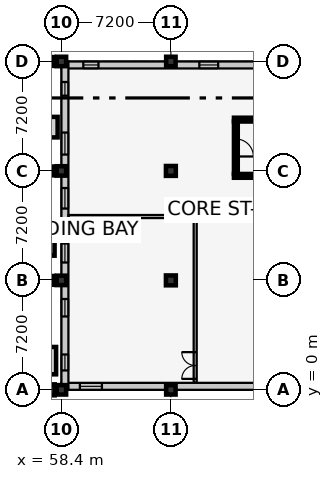
"""IFC4 building model, lengths in metres.
Left out: names, types, materials, properties, quantities, classifications, styles, units other than length and angle.
Written with IfcOpenShell. Run it as: python <this file> out.ifc"""

import sys

from ifc_helpers import new_model, si_unit, direction, frame, frame_2d, origin, origin_2d, place, context, subcontext, project, spatial, rectangle, extrude, element, fill, save


model = new_model("IFC4")
c1 = context("Model", 3, precision=1e-05, world=origin(), true_north=direction((0.0, 1.0)))
c2 = subcontext(c1, "Body", "Model", "MODEL_VIEW")
j1 = project(units=[si_unit("LENGTHUNIT", "METRE"), si_unit("PLANEANGLEUNIT", "RADIAN")], contexts=[c1])
p1 = place(None, origin())
s1 = spatial("IfcSite", under=j1, at=p1, CompositionType="ELEMENT")
p2 = place(p1, origin())
s2 = spatial("IfcBuilding", under=s1, at=p2, CompositionType="ELEMENT")
p3 = place(p2, origin())
s3 = spatial("IfcBuildingStorey", under=s2, at=p3, CompositionType="ELEMENT", Elevation=0.0)
p4 = place(p3, frame((57.6, 0.0, 0.0), z_axis=(0.0, 0.0, 1.0), x_axis=(1.0, 0.0, 0.0)))
e1 = element("IfcColumn", 1, at=p4, inside=s3, PredefinedType="COLUMN", context=c2, shape_type="SweptSolid", body=[
    extrude(rectangle(XDim=0.72, YDim=0.72, at=origin_2d()), origin(), (0.0, 0.0, 1.0), 5.4),
])
for number, where, z_axis, x_axis in (
    (2, (57.6, 7.2, 0.0), (0.0, 0.0, 1.0), (1.0, 0.0, 0.0)),
    (3, (57.6, 14.4, 0.0), (0.0, 0.0, 1.0), (1.0, 0.0, 0.0)),
    (4, (57.6, 21.6, 0.0), (0.0, 0.0, 1.0), (1.0, 0.0, 0.0)),
):
    element("IfcColumn", number, at=place(p3, frame(where, z_axis=z_axis, x_axis=x_axis)), inside=s3, PredefinedType="COLUMN", context=c2, shape_type="SweptSolid", body=[
        extrude(rectangle(XDim=0.58, YDim=0.58, at=origin_2d()), origin(), (0.0, 0.0, 1.0), 5.4),
    ])
for number, where, z_axis, x_axis in (
    (5, (58.4, 0.0, 0.0), (0.0, 0.0, 1.0), (1.0, 0.0, 0.0)),
    (6, (58.4, 7.2, 0.0), (0.0, 0.0, 1.0), (1.0, 0.0, 0.0)),
    (7, (58.4, 14.4, 0.0), (0.0, 0.0, 1.0), (1.0, 0.0, 0.0)),
    (8, (58.4, 21.6, 0.0), (0.0, 0.0, 1.0), (1.0, 0.0, 0.0)),
    (9, (65.6, 0.0, 0.0), (0.0, 0.0, 1.0), (1.0, 0.0, 0.0)),
):
    element("IfcColumn", number, at=place(p3, frame(where, z_axis=z_axis, x_axis=x_axis)), inside=s3, PredefinedType="COLUMN", context=c2, shape_type="SweptSolid", body=[
        extrude(rectangle(XDim=0.62, YDim=0.62, at=origin_2d()), origin(), (0.0, 0.0, 1.0), 5.4),
    ])
for number, where, z_axis, x_axis in (
    (10, (65.6, 7.2, 0.0), (0.0, 0.0, 1.0), (1.0, 0.0, 0.0)),
    (11, (65.6, 14.4, 0.0), (0.0, 0.0, 1.0), (1.0, 0.0, 0.0)),
):
    element("IfcColumn", number, at=place(p3, frame(where, z_axis=z_axis, x_axis=x_axis)), inside=s3, PredefinedType="COLUMN", context=c2, shape_type="SweptSolid", body=[
        extrude(rectangle(XDim=0.65, YDim=0.65, at=origin_2d()), origin(), (0.0, 0.0, 1.0), 5.4),
    ])
p5 = place(p3, frame((65.6, 21.6, 0.0), z_axis=(0.0, 0.0, 1.0), x_axis=(1.0, 0.0, 0.0)))
e12 = element("IfcColumn", 12, at=p5, inside=s3, PredefinedType="COLUMN", context=c2, shape_type="SweptSolid", body=[
    extrude(rectangle(XDim=0.62, YDim=0.62, at=origin_2d()), origin(), (0.0, 0.0, 1.0), 5.4),
])
p6 = place(p3, frame((108.8, 0.23, 0.0), z_axis=(0.0, 0.0, 1.0), x_axis=(-1.0, 0.0, 0.0)))
e13 = element("IfcWall", 13, at=p6, inside=s3, PredefinedType="SOLIDWALL", context=c2, shape_type="SweptSolid", body=[
    extrude(rectangle(XDim=50.4, YDim=0.46, at=frame_2d((25.2, 0.0))), origin(), (0.0, 0.0, 1.0), 4.445),
])
p7 = place(p6, frame((31.2, 0.0, 0.0)))
e14 = element("IfcOpeningElement", 14, at=p7, cuts=e13, PredefinedType="OPENING", context=c2, shape_type="SweptSolid", body=[
    extrude(rectangle(XDim=2.4, YDim=2.4, at=frame_2d((1.2, 1.2))), frame((0.0, 0.242, 0.0), z_axis=(0.0, -1.0, 0.0), x_axis=(1.0, 0.0, 0.0)), (0.0, 0.0, 1.0), 0.484),
])
p8 = place(p6, frame((24.4, 0.0, 0.0)))
e15 = element("IfcOpeningElement", 15, at=p8, cuts=e13, PredefinedType="OPENING", context=c2, shape_type="SweptSolid", body=[
    extrude(rectangle(XDim=2.4, YDim=2.4, at=frame_2d((1.2, 1.2))), frame((0.0, 0.242, 0.0), z_axis=(0.0, -1.0, 0.0), x_axis=(1.0, 0.0, 0.0)), (0.0, 0.0, 1.0), 0.484),
])
p9 = place(p6, frame((1.188, 0.0, 0.9)))
e16 = element("IfcOpeningElement", 16, at=p9, cuts=e13, PredefinedType="OPENING", context=c2, shape_type="SweptSolid", body=[
    extrude(rectangle(XDim=1.5, YDim=1.75, at=frame_2d((0.75, 0.875))), frame((0.0, 0.242, 0.0), z_axis=(0.0, -1.0, 0.0), x_axis=(1.0, 0.0, 0.0)), (0.0, 0.0, 1.0), 0.484),
])
p10 = place(p6, frame((5.365, 0.0, 0.9)))
e17 = element("IfcOpeningElement", 17, at=p10, cuts=e13, PredefinedType="OPENING", context=c2, shape_type="SweptSolid", body=[
    extrude(rectangle(XDim=0.9, YDim=1.35, at=frame_2d((0.45, 0.675))), frame((0.0, 0.242, 0.0), z_axis=(0.0, -1.0, 0.0), x_axis=(1.0, 0.0, 0.0)), (0.0, 0.0, 1.0), 0.484),
])
p11 = place(p6, frame((9.192, 0.0, 0.9)))
e18 = element("IfcOpeningElement", 18, at=p11, cuts=e13, PredefinedType="OPENING", context=c2, shape_type="SweptSolid", body=[
    extrude(rectangle(XDim=1.0, YDim=1.35, at=frame_2d((0.5, 0.675))), frame((0.0, 0.242, 0.0), z_axis=(0.0, -1.0, 0.0), x_axis=(1.0, 0.0, 0.0)), (0.0, 0.0, 1.0), 0.484),
])
p12 = place(p6, frame((16.846, 0.0, 0.9)))
e19 = element("IfcOpeningElement", 19, at=p12, cuts=e13, PredefinedType="OPENING", context=c2, shape_type="SweptSolid", body=[
    extrude(rectangle(XDim=1.2, YDim=1.35, at=frame_2d((0.6, 0.675))), frame((0.0, 0.242, 0.0), z_axis=(0.0, -1.0, 0.0), x_axis=(1.0, 0.0, 0.0)), (0.0, 0.0, 1.0), 0.484),
])
p13 = place(p6, frame((47.737, 0.0, 0.9)))
e20 = element("IfcOpeningElement", 20, at=p13, cuts=e13, PredefinedType="OPENING", context=c2, shape_type="SweptSolid", body=[
    extrude(rectangle(XDim=1.45, YDim=1.45, at=frame_2d((0.725, 0.725))), frame((0.0, 0.242, 0.0), z_axis=(0.0, -1.0, 0.0), x_axis=(1.0, 0.0, 0.0)), (0.0, 0.0, 1.0), 0.484),
])
p14 = place(p3, frame((58.4, 21.37, 0.0), z_axis=(0.0, 0.0, 1.0), x_axis=(1.0, 0.0, 0.0)))
e21 = element("IfcWall", 21, at=p14, inside=s3, PredefinedType="SOLIDWALL", context=c2, shape_type="SweptSolid", body=[
    extrude(rectangle(XDim=50.4, YDim=0.46, at=frame_2d((25.2, 0.0))), origin(), (0.0, 0.0, 1.0), 4.445),
])
p15 = place(p14, frame((45.4, 0.0, 0.0)))
e22 = element("IfcOpeningElement", 22, at=p15, cuts=e21, PredefinedType="OPENING", context=c2, shape_type="SweptSolid", body=[
    extrude(rectangle(XDim=2.0, YDim=2.35, at=frame_2d((1.0, 1.175))), frame((0.0, 0.242, 0.0), z_axis=(0.0, -1.0, 0.0), x_axis=(1.0, 0.0, 0.0)), (0.0, 0.0, 1.0), 0.484),
])
p16 = place(p14, frame((1.438, 0.0, 0.9)))
e23 = element("IfcOpeningElement", 23, at=p16, cuts=e21, PredefinedType="OPENING", context=c2, shape_type="SweptSolid", body=[
    extrude(rectangle(XDim=1.0, YDim=1.75, at=frame_2d((0.5, 0.875))), frame((0.0, 0.242, 0.0), z_axis=(0.0, -1.0, 0.0), x_axis=(1.0, 0.0, 0.0)), (0.0, 0.0, 1.0), 0.484),
])
p17 = place(p14, frame((9.072, 0.0, 0.9)))
e24 = element("IfcOpeningElement", 24, at=p17, cuts=e21, PredefinedType="OPENING", context=c2, shape_type="SweptSolid", body=[
    extrude(rectangle(XDim=1.24, YDim=1.75, at=frame_2d((0.62, 0.875))), frame((0.0, 0.242, 0.0), z_axis=(0.0, -1.0, 0.0), x_axis=(1.0, 0.0, 0.0)), (0.0, 0.0, 1.0), 0.484),
])
p18 = place(p14, frame((16.726, 0.0, 0.9)))
e25 = element("IfcOpeningElement", 25, at=p18, cuts=e21, PredefinedType="OPENING", context=c2, shape_type="SweptSolid", body=[
    extrude(rectangle(XDim=1.44, YDim=1.75, at=frame_2d((0.72, 0.875))), frame((0.0, 0.242, 0.0), z_axis=(0.0, -1.0, 0.0), x_axis=(1.0, 0.0, 0.0)), (0.0, 0.0, 1.0), 0.484),
])
p19 = place(p14, frame((24.75, 0.0, 0.9)))
e26 = element("IfcOpeningElement", 26, at=p19, cuts=e21, PredefinedType="OPENING", context=c2, shape_type="SweptSolid", body=[
    extrude(rectangle(XDim=0.9, YDim=1.35, at=frame_2d((0.45, 0.675))), frame((0.0, 0.242, 0.0), z_axis=(0.0, -1.0, 0.0), x_axis=(1.0, 0.0, 0.0)), (0.0, 0.0, 1.0), 0.484),
])
p20 = place(p14, frame((40.058, 0.0, 0.9)))
e27 = element("IfcOpeningElement", 27, at=p20, cuts=e21, PredefinedType="OPENING", context=c2, shape_type="SweptSolid", body=[
    extrude(rectangle(XDim=1.3, YDim=1.35, at=frame_2d((0.65, 0.675))), frame((0.0, 0.242, 0.0), z_axis=(0.0, -1.0, 0.0), x_axis=(1.0, 0.0, 0.0)), (0.0, 0.0, 1.0), 0.484),
])
p21 = place(p3, frame((58.63, 0.0, 0.0), z_axis=(0.0, 0.0, 1.0), x_axis=(0.0, 1.0, 0.0)))
e28 = element("IfcWall", 28, at=p21, inside=s3, PredefinedType="SOLIDWALL", context=c2, shape_type="SweptSolid", body=[
    extrude(rectangle(XDim=21.6, YDim=0.46, at=frame_2d((10.8, 0.0))), origin(), (0.0, 0.0, 1.0), 4.545),
])
p22 = place(p21, frame((1.275, 0.0, 0.9)))
e29 = element("IfcOpeningElement", 29, at=p22, cuts=e28, PredefinedType="OPENING", context=c2, shape_type="SweptSolid", body=[
    extrude(rectangle(XDim=1.05, YDim=1.45, at=frame_2d((0.525, 0.725))), frame((0.0, 0.242, 0.0), z_axis=(0.0, -1.0, 0.0), x_axis=(1.0, 0.0, 0.0)), (0.0, 0.0, 1.0), 0.484),
])
p23 = place(p21, frame((4.825, 0.0, 0.9)))
e30 = element("IfcOpeningElement", 30, at=p23, cuts=e28, PredefinedType="OPENING", context=c2, shape_type="SweptSolid", body=[
    extrude(rectangle(XDim=1.15, YDim=1.45, at=frame_2d((0.575, 0.725))), frame((0.0, 0.242, 0.0), z_axis=(0.0, -1.0, 0.0), x_axis=(1.0, 0.0, 0.0)), (0.0, 0.0, 1.0), 0.484),
])
p24 = place(p21, frame((8.375, 0.0, 0.9)))
e31 = element("IfcOpeningElement", 31, at=p24, cuts=e28, PredefinedType="OPENING", context=c2, shape_type="SweptSolid", body=[
    extrude(rectangle(XDim=1.25, YDim=1.45, at=frame_2d((0.625, 0.725))), frame((0.0, 0.242, 0.0), z_axis=(0.0, -1.0, 0.0), x_axis=(1.0, 0.0, 0.0)), (0.0, 0.0, 1.0), 0.484),
])
p25 = place(p21, frame((11.925, 0.0, 0.9)))
e32 = element("IfcOpeningElement", 32, at=p25, cuts=e28, PredefinedType="OPENING", context=c2, shape_type="SweptSolid", body=[
    extrude(rectangle(XDim=1.35, YDim=1.45, at=frame_2d((0.675, 0.725))), frame((0.0, 0.242, 0.0), z_axis=(0.0, -1.0, 0.0), x_axis=(1.0, 0.0, 0.0)), (0.0, 0.0, 1.0), 0.484),
])
p26 = place(p21, frame((15.475, 0.0, 0.9)))
e33 = element("IfcOpeningElement", 33, at=p26, cuts=e28, PredefinedType="OPENING", context=c2, shape_type="SweptSolid", body=[
    extrude(rectangle(XDim=1.45, YDim=1.45, at=frame_2d((0.725, 0.725))), frame((0.0, 0.242, 0.0), z_axis=(0.0, -1.0, 0.0), x_axis=(1.0, 0.0, 0.0)), (0.0, 0.0, 1.0), 0.484),
])
p27 = place(p21, frame((19.35, 0.0, 0.9)))
e34 = element("IfcOpeningElement", 34, at=p27, cuts=e28, PredefinedType="OPENING", context=c2, shape_type="SweptSolid", body=[
    extrude(rectangle(XDim=0.9, YDim=1.6, at=frame_2d((0.45, 0.8))), frame((0.0, 0.242, 0.0), z_axis=(0.0, -1.0, 0.0), x_axis=(1.0, 0.0, 0.0)), (0.0, 0.0, 1.0), 0.484),
])
for number, where, z_axis, x_axis in (
    (35, (69.75, 14.075, 0.0), (0.0, 0.0, 1.0), (1.0, 0.0, 0.0)),
    (36, (78.65, 17.775, 0.0), (0.0, 0.0, 1.0), (-1.0, 0.0, 0.0)),
):
    element("IfcWall", number, at=place(p3, frame(where, z_axis=z_axis, x_axis=x_axis)), inside=s3, PredefinedType="SHEAR", context=c2, shape_type="SweptSolid", body=[
        extrude(rectangle(XDim=8.9, YDim=0.25, at=frame_2d((4.45, 0.0))), origin(), (0.0, 0.0, 1.0), 5.15),
    ])
p28 = place(p3, frame((69.875, 17.65, 0.0), z_axis=(0.0, 0.0, 1.0), x_axis=(0.0, -1.0, 0.0)))
e37 = element("IfcWall", 37, at=p28, inside=s3, PredefinedType="SHEAR", context=c2, shape_type="SweptSolid", body=[
    extrude(rectangle(XDim=3.45, YDim=0.25, at=frame_2d((1.725, 0.0))), origin(), (0.0, 0.0, 1.0), 5.15),
])
p29 = place(p28, frame((1.15, 0.0, 0.0)))
e38 = element("IfcOpeningElement", 38, at=p29, cuts=e37, PredefinedType="OPENING", context=c2, shape_type="SweptSolid", body=[
    extrude(rectangle(XDim=1.15, YDim=2.15, at=frame_2d((0.575, 1.075))), frame((0.0, 0.137, 0.0), z_axis=(0.0, -1.0, 0.0), x_axis=(1.0, 0.0, 0.0)), (0.0, 0.0, 1.0), 0.274),
])
p30 = place(p3, frame((58.87, 11.4, 0.0), z_axis=(0.0, 0.0, 1.0), x_axis=(1.0, 0.0, 0.0)))
e39 = element("IfcWall", 39, at=p30, inside=s3, PredefinedType="PARTITIONING", context=c2, shape_type="SweptSolid", body=[
    extrude(rectangle(XDim=8.33, YDim=0.2, at=frame_2d((4.165, 0.0))), origin(), (0.0, 0.0, 1.0), 5.15),
])
p31 = place(p3, frame((67.2, 0.47, 0.0), z_axis=(0.0, 0.0, 1.0), x_axis=(0.0, 1.0, 0.0)))
e40 = element("IfcWall", 40, at=p31, inside=s3, PredefinedType="PARTITIONING", context=c2, shape_type="SweptSolid", body=[
    extrude(rectangle(XDim=10.82, YDim=0.2, at=frame_2d((5.41, 0.0))), origin(), (0.0, 0.0, 1.0), 5.15),
])
p32 = place(p31, frame((0.25, 0.0, 0.0)))
e41 = element("IfcOpeningElement", 41, at=p32, cuts=e40, PredefinedType="OPENING", context=c2, shape_type="SweptSolid", body=[
    extrude(rectangle(XDim=1.76, YDim=2.3, at=frame_2d((0.88, 1.15))), frame((0.0, 0.112, 0.0), z_axis=(0.0, -1.0, 0.0), x_axis=(1.0, 0.0, 0.0)), (0.0, 0.0, 1.0), 0.224),
])
p33 = place(p13, origin())
e42 = element("IfcWindow", 42, at=p33, inside=s3, PartitioningType="SINGLE_PANEL", PredefinedType="WINDOW", context=c2, shape_type="SweptSolid", body=[
    extrude(rectangle(XDim=1.45, YDim=1.45, at=frame_2d((0.725, 0.725))), frame((0.0, 0.03, 0.0), z_axis=(0.0, -1.0, 0.0), x_axis=(1.0, 0.0, 0.0)), (0.0, 0.0, 1.0), 0.06),
])
fill(e20, e42)
p34 = place(p16, origin())
e43 = element("IfcWindow", 43, at=p34, inside=s3, PartitioningType="SINGLE_PANEL", PredefinedType="WINDOW", context=c2, shape_type="SweptSolid", body=[
    extrude(rectangle(XDim=1.0, YDim=1.75, at=frame_2d((0.5, 0.875))), frame((0.0, 0.03, 0.0), z_axis=(0.0, -1.0, 0.0), x_axis=(1.0, 0.0, 0.0)), (0.0, 0.0, 1.0), 0.06),
])
fill(e23, e43)
p35 = place(p17, origin())
e44 = element("IfcWindow", 44, at=p35, inside=s3, PartitioningType="SINGLE_PANEL", PredefinedType="WINDOW", context=c2, shape_type="SweptSolid", body=[
    extrude(rectangle(XDim=1.24, YDim=1.75, at=frame_2d((0.62, 0.875))), frame((0.0, 0.03, 0.0), z_axis=(0.0, -1.0, 0.0), x_axis=(1.0, 0.0, 0.0)), (0.0, 0.0, 1.0), 0.06),
])
fill(e24, e44)
p36 = place(p22, origin())
e45 = element("IfcWindow", 45, at=p36, inside=s3, PartitioningType="SINGLE_PANEL", PredefinedType="WINDOW", context=c2, shape_type="SweptSolid", body=[
    extrude(rectangle(XDim=1.05, YDim=1.45, at=frame_2d((0.525, 0.725))), frame((0.0, 0.03, 0.0), z_axis=(0.0, -1.0, 0.0), x_axis=(1.0, 0.0, 0.0)), (0.0, 0.0, 1.0), 0.06),
])
fill(e29, e45)
p37 = place(p23, origin())
e46 = element("IfcWindow", 46, at=p37, inside=s3, PartitioningType="SINGLE_PANEL", PredefinedType="WINDOW", context=c2, shape_type="SweptSolid", body=[
    extrude(rectangle(XDim=1.15, YDim=1.45, at=frame_2d((0.575, 0.725))), frame((0.0, 0.03, 0.0), z_axis=(0.0, -1.0, 0.0), x_axis=(1.0, 0.0, 0.0)), (0.0, 0.0, 1.0), 0.06),
])
fill(e30, e46)
p38 = place(p24, origin())
e47 = element("IfcWindow", 47, at=p38, inside=s3, PartitioningType="SINGLE_PANEL", PredefinedType="WINDOW", context=c2, shape_type="SweptSolid", body=[
    extrude(rectangle(XDim=1.25, YDim=1.45, at=frame_2d((0.625, 0.725))), frame((0.0, 0.03, 0.0), z_axis=(0.0, -1.0, 0.0), x_axis=(1.0, 0.0, 0.0)), (0.0, 0.0, 1.0), 0.06),
])
fill(e31, e47)
p39 = place(p25, origin())
e48 = element("IfcWindow", 48, at=p39, inside=s3, PartitioningType="SINGLE_PANEL", PredefinedType="WINDOW", context=c2, shape_type="SweptSolid", body=[
    extrude(rectangle(XDim=1.35, YDim=1.45, at=frame_2d((0.675, 0.725))), frame((0.0, 0.03, 0.0), z_axis=(0.0, -1.0, 0.0), x_axis=(1.0, 0.0, 0.0)), (0.0, 0.0, 1.0), 0.06),
])
fill(e32, e48)
p40 = place(p26, origin())
e49 = element("IfcWindow", 49, at=p40, inside=s3, PartitioningType="SINGLE_PANEL", PredefinedType="WINDOW", context=c2, shape_type="SweptSolid", body=[
    extrude(rectangle(XDim=1.45, YDim=1.45, at=frame_2d((0.725, 0.725))), frame((0.0, 0.03, 0.0), z_axis=(0.0, -1.0, 0.0), x_axis=(1.0, 0.0, 0.0)), (0.0, 0.0, 1.0), 0.06),
])
fill(e33, e49)
p41 = place(p27, origin())
e50 = element("IfcWindow", 50, at=p41, inside=s3, PartitioningType="SINGLE_PANEL", PredefinedType="WINDOW", context=c2, shape_type="SweptSolid", body=[
    extrude(rectangle(XDim=0.9, YDim=1.6, at=frame_2d((0.45, 0.8))), frame((0.0, 0.03, 0.0), z_axis=(0.0, -1.0, 0.0), x_axis=(1.0, 0.0, 0.0)), (0.0, 0.0, 1.0), 0.06),
])
fill(e34, e50)
p42 = place(p29, origin())
e51 = element("IfcDoor", 51, at=p42, inside=s3, OperationType="SINGLE_SWING_RIGHT", PredefinedType="DOOR", context=c2, shape_type="SweptSolid", body=[
    extrude(rectangle(XDim=1.15, YDim=2.15, at=frame_2d((0.575, 1.075))), frame((0.0, 0.025, 0.0), z_axis=(0.0, -1.0, 0.0), x_axis=(1.0, 0.0, 0.0)), (0.0, 0.0, 1.0), 0.05),
])
fill(e38, e51)
p43 = place(p32, origin())
e52 = element("IfcDoor", 52, at=p43, inside=s3, OperationType="DOUBLE_DOOR_SINGLE_SWING", PredefinedType="DOOR", context=c2, shape_type="SweptSolid", body=[
    extrude(rectangle(XDim=1.76, YDim=2.3, at=frame_2d((0.88, 1.15))), frame((0.0, 0.025, 0.0), z_axis=(0.0, -1.0, 0.0), x_axis=(1.0, 0.0, 0.0)), (0.0, 0.0, 1.0), 0.05),
])
fill(e41, e52)
save(model, sys.argv[1])
